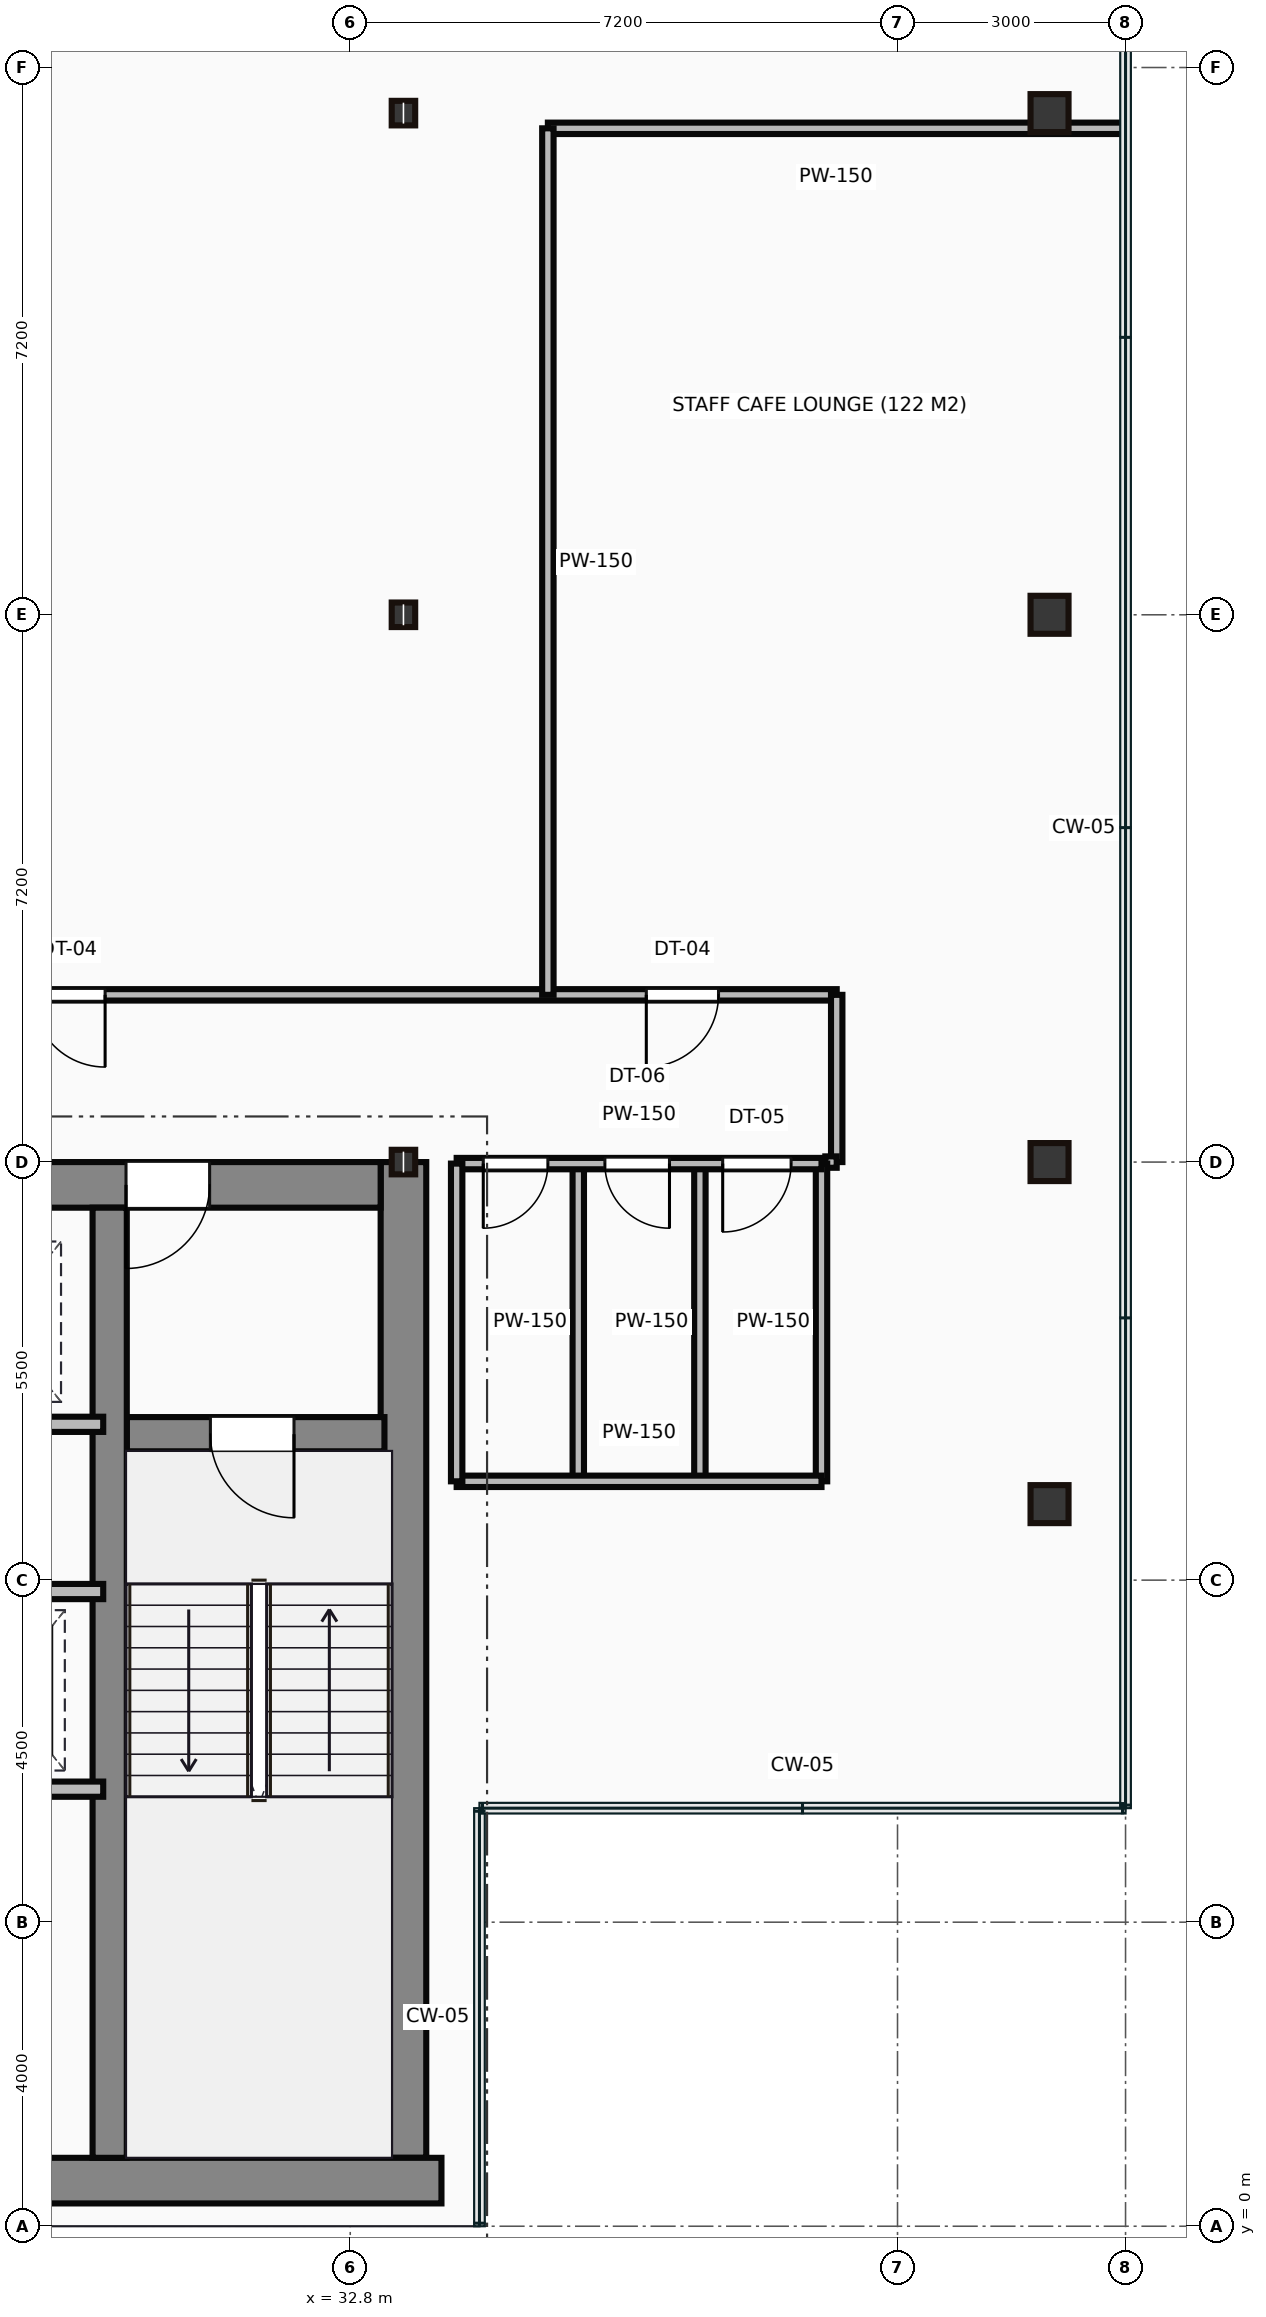
"""IFC4 building model, lengths in metres.
Left out: names, types, materials, properties, quantities, classifications, styles, units other than length and angle.
Written with IfcOpenShell. Run it as: python <this file> out.ifc"""

import sys

from ifc_helpers import new_model, si_unit, direction, frame, frame_2d, origin, origin_2d, place, context, subcontext, project, spatial, rectangle, hollow_rectangle, i_section, extrude, source, transform, mapped, element, fill, save


model = new_model("IFC4")
c1 = context("Model", 3, precision=1e-05, world=origin(), true_north=direction((0.0, 1.0)))
c2 = subcontext(c1, "Body", "Model", "MODEL_VIEW")
j1 = project(units=[si_unit("LENGTHUNIT", "METRE"), si_unit("PLANEANGLEUNIT", "RADIAN")], contexts=[c1])
p1 = place(None, origin())
s1 = spatial("IfcSite", under=j1, at=p1, CompositionType="ELEMENT")
p2 = place(p1, origin())
s2 = spatial("IfcBuilding", under=s1, at=p2, CompositionType="ELEMENT")
p3 = place(p2, frame((0.0, 0.0, 192.25)))
s3 = spatial("IfcBuildingStorey", under=s2, at=p3, CompositionType="ELEMENT", Elevation=192.25)
m1 = source(origin(), c2, "Body", "SweptSolid", [
    extrude(rectangle(XDim=29.5, YDim=0.6, at=frame_2d((14.75, 0.0))), origin(), (0.0, 0.0, 1.0), 3.65),
])
p4 = place(p3, frame((4.5, 0.6, 0.0), z_axis=(0.0, 0.0, 1.0), x_axis=(1.0, 0.0, 0.0)))
e1 = element("IfcWall", 1, at=p4, inside=s3, PredefinedType="SHEAR", context=c2, shape_type="MappedRepresentation", body=[
    mapped(m1, transform((0.0, 0.0, 0.0))),
])
m2 = source(origin(), c2, "Body", "SweptSolid", [
    extrude(rectangle(XDim=13.1, YDim=0.6, at=frame_2d((6.55, 0.0))), origin(), (0.0, 0.0, 1.0), 3.65),
])
p5 = place(p3, frame((33.5, 0.9, 0.0), z_axis=(0.0, 0.0, 1.0), x_axis=(0.0, 1.0, 0.0)))
e2 = element("IfcWall", 2, at=p5, inside=s3, PredefinedType="SHEAR", context=c2, shape_type="MappedRepresentation", body=[
    mapped(m2, transform((0.0, 0.0, 0.0))),
])
m3 = source(origin(), c2, "Body", "SweptSolid", [
    extrude(rectangle(XDim=12.6, YDim=0.6, at=frame_2d((6.3, 0.0))), origin(), (0.0, 0.0, 1.0), 3.65),
])
p6 = place(p3, frame((20.6, 13.7, 0.0), z_axis=(0.0, 0.0, 1.0), x_axis=(1.0, 0.0, 0.0)))
e3 = element("IfcWall", 3, at=p6, inside=s3, PredefinedType="SHEAR", context=c2, shape_type="MappedRepresentation", body=[
    mapped(m3, transform((0.0, 0.0, 0.0))),
])
p7 = place(p6, frame((9.25, 0.0, 0.0)))
e4 = element("IfcOpeningElement", 4, at=p7, cuts=e3, PredefinedType="OPENING", context=c2, shape_type="SweptSolid", body=[
    extrude(rectangle(XDim=1.1, YDim=2.15, at=frame_2d((0.55, 1.075))), frame((0.0, 0.31, 0.0), z_axis=(0.0, -1.0, 0.0), x_axis=(1.0, 0.0, 0.0)), (0.0, 0.0, 1.0), 0.62),
])
m4 = source(origin(), c2, "Body", "SweptSolid", [
    extrude(rectangle(XDim=12.5, YDim=0.45, at=frame_2d((6.25, 0.0))), origin(), (0.0, 0.0, 1.0), 3.65),
])
p8 = place(p3, frame((29.635, 0.9, 0.0), z_axis=(0.0, 0.0, 1.0), x_axis=(0.0, 1.0, 0.0)))
e5 = element("IfcWall", 5, at=p8, inside=s3, PredefinedType="SHEAR", context=c2, shape_type="MappedRepresentation", body=[
    mapped(m4, transform((0.0, 0.0, 0.0))),
])
m5 = source(origin(), c2, "Body", "SweptSolid", [
    extrude(rectangle(XDim=3.39, YDim=0.45, at=frame_2d((1.695, 0.0))), origin(), (0.0, 0.0, 1.0), 3.65),
])
p9 = place(p3, frame((29.86, 10.42, 0.0), z_axis=(0.0, 0.0, 1.0), x_axis=(1.0, 0.0, 0.0)))
e6 = element("IfcWall", 6, at=p9, inside=s3, PredefinedType="SHEAR", context=c2, shape_type="MappedRepresentation", body=[
    mapped(m5, transform((0.0, 0.0, 0.0))),
])
p10 = place(p9, frame((1.1, 0.0, 0.0)))
e7 = element("IfcOpeningElement", 7, at=p10, cuts=e6, PredefinedType="OPENING", context=c2, shape_type="SweptSolid", body=[
    extrude(rectangle(XDim=1.1, YDim=2.15, at=frame_2d((0.55, 1.075))), frame((0.0, 0.235, 0.0), z_axis=(0.0, -1.0, 0.0), x_axis=(1.0, 0.0, 0.0)), (0.0, 0.0, 1.0), 0.47),
])
m6 = source(origin(), c2, "Body", "SweptSolid", [
    extrude(i_section(OverallWidth=0.309, OverallDepth=0.323, WebThickness=0.014, FlangeThickness=0.023, at=origin_2d()), origin(), (0.0, 0.0, 1.0), 3.65),
])
for number, where, z_axis, x_axis in (
    (8, (33.5, 14.0, 0.0), (0.0, 0.0, 1.0), (1.0, 0.0, 0.0)),
    (9, (33.5, 21.2, 0.0), (0.0, 0.0, 1.0), (1.0, 0.0, 0.0)),
    (10, (33.5, 27.8, 0.0), (0.0, 0.0, 1.0), (1.0, 0.0, 0.0)),
):
    element("IfcColumn", number, at=place(p3, frame(where, z_axis=z_axis, x_axis=x_axis)), inside=s3, PredefinedType="COLUMN", context=c2, shape_type="MappedRepresentation", body=[
        mapped(m6, transform((0.0, 0.0, 0.0))),
    ])
m7 = source(origin(), c2, "Body", "SweptSolid", [
    extrude(hollow_rectangle(XDim=0.5, YDim=0.5, WallThickness=0.022, at=origin_2d()), origin(), (0.0, 0.0, 1.0), 3.65),
])
for number, where, z_axis, x_axis in (
    (11, (42.0, 9.5, 0.0), (0.0, 0.0, 1.0), (1.0, 0.0, 0.0)),
    (12, (42.0, 14.0, 0.0), (0.0, 0.0, 1.0), (1.0, 0.0, 0.0)),
    (13, (42.0, 21.2, 0.0), (0.0, 0.0, 1.0), (1.0, 0.0, 0.0)),
    (14, (42.0, 27.8, 0.0), (0.0, 0.0, 1.0), (1.0, 0.0, 0.0)),
):
    element("IfcColumn", number, at=place(p3, frame(where, z_axis=z_axis, x_axis=x_axis)), inside=s3, PredefinedType="COLUMN", context=c2, shape_type="MappedRepresentation", body=[
        mapped(m7, transform((0.0, 0.0, 0.0))),
    ])
m8 = source(origin(), c2, "Body", "SweptSolid", [
    extrude(rectangle(XDim=8.8, YDim=0.2, at=frame_2d((4.4, 0.0))), origin(), (0.0, 0.0, 1.0), 3.4),
])
p11 = place(p3, frame((20.75, 10.55, 0.0), z_axis=(0.0, 0.0, 1.0), x_axis=(1.0, 0.0, 0.0)))
e15 = element("IfcWall", 15, at=p11, inside=s3, PredefinedType="PARTITIONING", context=c2, shape_type="MappedRepresentation", body=[
    mapped(m8, transform((0.0, 0.0, 0.0))),
])
p12 = place(p11, frame((0.5, 0.0, 0.0)))
e16 = element("IfcOpeningElement", 16, at=p12, cuts=e15, PredefinedType="OPENING", context=c2, shape_type="SweptSolid", body=[
    extrude(rectangle(XDim=1.05, YDim=2.15, at=frame_2d((0.525, 1.075))), frame((0.0, 0.11, 0.0), z_axis=(0.0, -1.0, 0.0), x_axis=(1.0, 0.0, 0.0)), (0.0, 0.0, 1.0), 0.22),
])
p13 = place(p11, frame((2.6, 0.0, 0.0)))
e17 = element("IfcOpeningElement", 17, at=p13, cuts=e15, PredefinedType="OPENING", context=c2, shape_type="SweptSolid", body=[
    extrude(rectangle(XDim=1.05, YDim=2.15, at=frame_2d((0.525, 1.075))), frame((0.0, 0.11, 0.0), z_axis=(0.0, -1.0, 0.0), x_axis=(1.0, 0.0, 0.0)), (0.0, 0.0, 1.0), 0.22),
])
p14 = place(p11, frame((4.7, 0.0, 0.0)))
e18 = element("IfcOpeningElement", 18, at=p14, cuts=e15, PredefinedType="OPENING", context=c2, shape_type="SweptSolid", body=[
    extrude(rectangle(XDim=1.05, YDim=2.15, at=frame_2d((0.525, 1.075))), frame((0.0, 0.11, 0.0), z_axis=(0.0, -1.0, 0.0), x_axis=(1.0, 0.0, 0.0)), (0.0, 0.0, 1.0), 0.22),
])
p15 = place(p11, frame((6.8, 0.0, 0.0)))
e19 = element("IfcOpeningElement", 19, at=p15, cuts=e15, PredefinedType="OPENING", context=c2, shape_type="SweptSolid", body=[
    extrude(rectangle(XDim=1.05, YDim=2.15, at=frame_2d((0.525, 1.075))), frame((0.0, 0.11, 0.0), z_axis=(0.0, -1.0, 0.0), x_axis=(1.0, 0.0, 0.0)), (0.0, 0.0, 1.0), 0.22),
])
m9 = source(origin(), c2, "Body", "SweptSolid", [
    extrude(rectangle(XDim=4.55, YDim=0.2, at=frame_2d((2.275, 0.0))), origin(), (0.0, 0.0, 1.0), 3.4),
])
p16 = place(p3, frame((25.0, 8.35, 0.0), z_axis=(0.0, 0.0, 1.0), x_axis=(1.0, 0.0, 0.0)))
e20 = element("IfcWall", 20, at=p16, inside=s3, PredefinedType="PARTITIONING", context=c2, shape_type="MappedRepresentation", body=[
    mapped(m9, transform((0.0, 0.0, 0.0))),
])
p17 = place(p16, frame((0.5, 0.0, 0.0)))
e21 = element("IfcOpeningElement", 21, at=p17, cuts=e20, PredefinedType="OPENING", context=c2, shape_type="SweptSolid", body=[
    extrude(rectangle(XDim=1.05, YDim=2.15, at=frame_2d((0.525, 1.075))), frame((0.0, 0.11, 0.0), z_axis=(0.0, -1.0, 0.0), x_axis=(1.0, 0.0, 0.0)), (0.0, 0.0, 1.0), 0.22),
])
p18 = place(p16, frame((2.6, 0.0, 0.0)))
e22 = element("IfcOpeningElement", 22, at=p18, cuts=e20, PredefinedType="OPENING", context=c2, shape_type="SweptSolid", body=[
    extrude(rectangle(XDim=1.05, YDim=2.15, at=frame_2d((0.525, 1.075))), frame((0.0, 0.11, 0.0), z_axis=(0.0, -1.0, 0.0), x_axis=(1.0, 0.0, 0.0)), (0.0, 0.0, 1.0), 0.22),
])
p19 = place(p3, frame((25.0, 5.75, 0.0), z_axis=(0.0, 0.0, 1.0), x_axis=(1.0, 0.0, 0.0)))
e23 = element("IfcWall", 23, at=p19, inside=s3, PredefinedType="PARTITIONING", context=c2, shape_type="MappedRepresentation", body=[
    mapped(m9, transform((0.0, 0.0, 0.0))),
])
m10 = source(origin(), c2, "Body", "SweptSolid", [
    extrude(rectangle(XDim=4.8, YDim=0.15, at=frame_2d((2.4, 0.0))), origin(), (0.0, 0.0, 1.0), 2.787),
])
p20 = place(p3, frame((34.2, 13.98, 0.0), z_axis=(0.0, 0.0, 1.0), x_axis=(1.0, 0.0, 0.0)))
e24 = element("IfcWall", 24, at=p20, inside=s3, PredefinedType="PARTITIONING", context=c2, shape_type="MappedRepresentation", body=[
    mapped(m10, transform((0.0, 0.0, 0.0))),
])
p21 = place(p20, frame((0.35, 0.0, 0.0)))
e25 = element("IfcOpeningElement", 25, at=p21, cuts=e24, PredefinedType="OPENING", context=c2, shape_type="SweptSolid", body=[
    extrude(rectangle(XDim=0.85, YDim=2.1, at=frame_2d((0.425, 1.05))), frame((0.0, 0.085, 0.0), z_axis=(0.0, -1.0, 0.0), x_axis=(1.0, 0.0, 0.0)), (0.0, 0.0, 1.0), 0.17),
])
p22 = place(p20, frame((1.95, 0.0, 0.0)))
e26 = element("IfcOpeningElement", 26, at=p22, cuts=e24, PredefinedType="OPENING", context=c2, shape_type="SweptSolid", body=[
    extrude(rectangle(XDim=0.85, YDim=2.1, at=frame_2d((0.425, 1.05))), frame((0.0, 0.085, 0.0), z_axis=(0.0, -1.0, 0.0), x_axis=(1.0, 0.0, 0.0)), (0.0, 0.0, 1.0), 0.17),
])
p23 = place(p20, frame((3.5, 0.0, 0.0)))
e27 = element("IfcOpeningElement", 27, at=p23, cuts=e24, PredefinedType="OPENING", context=c2, shape_type="SweptSolid", body=[
    extrude(rectangle(XDim=0.9, YDim=2.1, at=frame_2d((0.45, 1.05))), frame((0.0, 0.085, 0.0), z_axis=(0.0, -1.0, 0.0), x_axis=(1.0, 0.0, 0.0)), (0.0, 0.0, 1.0), 0.17),
])
m11 = source(origin(), c2, "Body", "SweptSolid", [
    extrude(rectangle(XDim=4.8, YDim=0.15, at=frame_2d((2.4, 0.0))), origin(), (0.0, 0.0, 1.0), 3.4),
])
p24 = place(p3, frame((34.2, 9.8, 0.0), z_axis=(0.0, 0.0, 1.0), x_axis=(1.0, 0.0, 0.0)))
e28 = element("IfcWall", 28, at=p24, inside=s3, PredefinedType="PARTITIONING", context=c2, shape_type="MappedRepresentation", body=[
    mapped(m11, transform((0.0, 0.0, 0.0))),
])
m12 = source(origin(), c2, "Body", "SweptSolid", [
    extrude(rectangle(XDim=4.18, YDim=0.15, at=frame_2d((2.09, 0.0))), origin(), (0.0, 0.0, 1.0), 3.4),
])
for number, where, z_axis, x_axis in (
    (29, (39.0, 9.8, 0.0), (0.0, 0.0, 1.0), (0.0, 1.0, 0.0)),
    (30, (34.2, 9.8, 0.0), (0.0, 0.0, 1.0), (0.0, 1.0, 0.0)),
    (31, (35.8, 9.8, 0.0), (0.0, 0.0, 1.0), (0.0, 1.0, 0.0)),
    (32, (37.4, 9.8, 0.0), (0.0, 0.0, 1.0), (0.0, 1.0, 0.0)),
):
    element("IfcWall", number, at=place(p3, frame(where, z_axis=z_axis, x_axis=x_axis)), inside=s3, PredefinedType="PARTITIONING", context=c2, shape_type="MappedRepresentation", body=[
        mapped(m12, transform((0.0, 0.0, 0.0))),
    ])
m13 = source(origin(), c2, "Body", "SweptSolid", [
    extrude(rectangle(XDim=20.2, YDim=0.15, at=frame_2d((10.1, 0.0))), origin(), (0.0, 0.0, 1.0), 3.4),
])
p25 = place(p3, frame((19.0, 16.2, 0.0), z_axis=(0.0, 0.0, 1.0), x_axis=(1.0, 0.0, 0.0)))
e33 = element("IfcWall", 33, at=p25, inside=s3, PredefinedType="PARTITIONING", context=c2, shape_type="MappedRepresentation", body=[
    mapped(m13, transform((0.0, 0.0, 0.0))),
])
p26 = place(p25, frame((9.625, 0.0, 0.0)))
e34 = element("IfcOpeningElement", 34, at=p26, cuts=e33, PredefinedType="OPENING", context=c2, shape_type="SweptSolid", body=[
    extrude(rectangle(XDim=0.95, YDim=2.15, at=frame_2d((0.475, 1.075))), frame((0.0, 0.085, 0.0), z_axis=(0.0, -1.0, 0.0), x_axis=(1.0, 0.0, 0.0)), (0.0, 0.0, 1.0), 0.17),
])
p27 = place(p25, frame((17.695, 0.0, 0.0)))
e35 = element("IfcOpeningElement", 35, at=p27, cuts=e33, PredefinedType="OPENING", context=c2, shape_type="SweptSolid", body=[
    extrude(rectangle(XDim=0.95, YDim=2.15, at=frame_2d((0.475, 1.075))), frame((0.0, 0.085, 0.0), z_axis=(0.0, -1.0, 0.0), x_axis=(1.0, 0.0, 0.0)), (0.0, 0.0, 1.0), 0.17),
])
m14 = source(origin(), c2, "Body", "SweptSolid", [
    extrude(rectangle(XDim=2.2, YDim=0.15, at=frame_2d((1.1, 0.0))), origin(), (0.0, 0.0, 1.0), 3.4),
])
p28 = place(p3, frame((39.2, 16.2, 0.0), z_axis=(0.0, 0.0, 1.0), x_axis=(0.0, -1.0, 0.0)))
e36 = element("IfcWall", 36, at=p28, inside=s3, PredefinedType="PARTITIONING", context=c2, shape_type="MappedRepresentation", body=[
    mapped(m14, transform((0.0, 0.0, 0.0))),
])
m15 = source(origin(), c2, "Body", "SweptSolid", [
    extrude(rectangle(XDim=0.15, YDim=0.15, at=frame_2d((0.075, 0.0))), origin(), (0.0, 0.0, 1.0), 3.4),
])
p29 = place(p3, frame((39.2, 14.0, 0.0), z_axis=(0.0, 0.0, 1.0), x_axis=(-1.0, 0.0, 0.0)))
e37 = element("IfcWall", 37, at=p29, inside=s3, PredefinedType="PARTITIONING", context=c2, shape_type="MappedRepresentation", body=[
    mapped(m15, transform((0.0, 0.0, 0.0))),
])
m16 = source(origin(), c2, "Body", "SweptSolid", [
    extrude(rectangle(XDim=7.58, YDim=0.15, at=frame_2d((3.79, 0.0))), origin(), (0.0, 0.0, 1.0), 3.4),
])
p30 = place(p3, frame((42.98, 27.6, 0.0), z_axis=(0.0, 0.0, 1.0), x_axis=(-1.0, 0.0, 0.0)))
e38 = element("IfcWall", 38, at=p30, inside=s3, PredefinedType="PARTITIONING", context=c2, shape_type="MappedRepresentation", body=[
    mapped(m16, transform((0.0, 0.0, 0.0))),
])
m17 = source(origin(), c2, "Body", "SweptSolid", [
    extrude(rectangle(XDim=11.4, YDim=0.15, at=frame_2d((5.7, 0.0))), origin(), (0.0, 0.0, 1.0), 3.4),
])
p31 = place(p3, frame((35.4, 27.6, 0.0), z_axis=(0.0, 0.0, 1.0), x_axis=(0.0, -1.0, 0.0)))
e39 = element("IfcWall", 39, at=p31, inside=s3, PredefinedType="PARTITIONING", context=c2, shape_type="MappedRepresentation", body=[
    mapped(m17, transform((0.0, 0.0, 0.0))),
])
m18 = source(origin(), c2, "Body", "SweptSolid", [
    extrude(rectangle(XDim=1.1, YDim=2.15, at=frame_2d((0.55, 1.075))), frame((0.0, 0.025, 0.0), z_axis=(0.0, -1.0, 0.0), x_axis=(1.0, 0.0, 0.0)), (0.0, 0.0, 1.0), 0.05),
])
p32 = place(p10, frame((1.1, 0.0, 0.0), z_axis=(0.0, 0.0, 1.0), x_axis=(-1.0, 0.0, 0.0)))
e40 = element("IfcDoor", 40, at=p32, inside=s3, OperationType="SINGLE_SWING_RIGHT", PredefinedType="DOOR", context=c2, shape_type="MappedRepresentation", body=[
    mapped(m18, transform((0.0, 0.0, 0.0))),
])
fill(e7, e40)
p33 = place(p7, origin())
e41 = element("IfcDoor", 41, at=p33, inside=s3, OperationType="SINGLE_SWING_LEFT", PredefinedType="DOOR", context=c2, shape_type="MappedRepresentation", body=[
    mapped(m18, transform((0.0, 0.0, 0.0))),
])
fill(e4, e41)
m19 = source(origin(), c2, "Body", "SweptSolid", [
    extrude(rectangle(XDim=0.85, YDim=2.1, at=frame_2d((0.425, 1.05))), frame((0.0, 0.025, 0.0), z_axis=(0.0, -1.0, 0.0), x_axis=(1.0, 0.0, 0.0)), (0.0, 0.0, 1.0), 0.05),
])
p34 = place(p21, frame((0.85, 0.0, 0.0), z_axis=(0.0, 0.0, 1.0), x_axis=(-1.0, 0.0, 0.0)))
e42 = element("IfcDoor", 42, at=p34, inside=s3, OperationType="SINGLE_SWING_LEFT", PredefinedType="DOOR", context=c2, shape_type="MappedRepresentation", body=[
    mapped(m19, transform((0.0, 0.0, 0.0))),
])
fill(e25, e42)
p35 = place(p22, frame((0.85, 0.0, 0.0), z_axis=(0.0, 0.0, 1.0), x_axis=(-1.0, 0.0, 0.0)))
e43 = element("IfcDoor", 43, at=p35, inside=s3, OperationType="SINGLE_SWING_RIGHT", PredefinedType="DOOR", context=c2, shape_type="MappedRepresentation", body=[
    mapped(m19, transform((0.0, 0.0, 0.0))),
])
fill(e26, e43)
m20 = source(origin(), c2, "Body", "SweptSolid", [
    extrude(rectangle(XDim=0.9, YDim=2.1, at=frame_2d((0.45, 1.05))), frame((0.0, 0.025, 0.0), z_axis=(0.0, -1.0, 0.0), x_axis=(1.0, 0.0, 0.0)), (0.0, 0.0, 1.0), 0.05),
])
p36 = place(p23, frame((0.9, 0.0, 0.0), z_axis=(0.0, 0.0, 1.0), x_axis=(-1.0, 0.0, 0.0)))
e44 = element("IfcDoor", 44, at=p36, inside=s3, OperationType="SINGLE_SWING_LEFT", PredefinedType="DOOR", context=c2, shape_type="MappedRepresentation", body=[
    mapped(m20, transform((0.0, 0.0, 0.0))),
])
fill(e27, e44)
m21 = source(origin(), c2, "Body", "SweptSolid", [
    extrude(rectangle(XDim=0.95, YDim=2.15, at=frame_2d((0.475, 1.075))), frame((0.0, 0.025, 0.0), z_axis=(0.0, -1.0, 0.0), x_axis=(1.0, 0.0, 0.0)), (0.0, 0.0, 1.0), 0.05),
])
p37 = place(p26, origin())
e45 = element("IfcDoor", 45, at=p37, inside=s3, OperationType="SINGLE_SWING_RIGHT", PredefinedType="DOOR", context=c2, shape_type="MappedRepresentation", body=[
    mapped(m21, transform((0.0, 0.0, 0.0))),
])
fill(e34, e45)
p38 = place(p27, origin())
e46 = element("IfcDoor", 46, at=p38, inside=s3, OperationType="SINGLE_SWING_LEFT", PredefinedType="DOOR", context=c2, shape_type="MappedRepresentation", body=[
    mapped(m21, transform((0.0, 0.0, 0.0))),
])
fill(e35, e46)
save(model, sys.argv[1])
